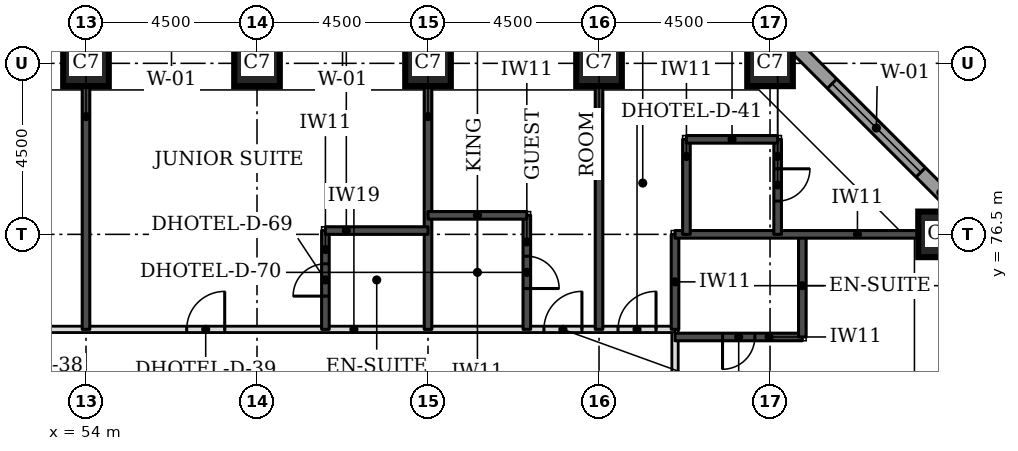
"""IFC4 building model, lengths in metres.
Left out: names, types, materials, properties, quantities, classifications, styles, units other than length and angle.
Written with IfcOpenShell. Run it as: python <this file> out.ifc"""

import sys

from ifc_helpers import new_model, si_unit, direction, frame, frame_2d, origin, origin_2d, place, context, subcontext, project, spatial, rectangle, extrude, element, fill, save


model = new_model("IFC4")
c1 = context("Model", 3, precision=1e-05, world=origin(), true_north=direction((0.0, 1.0)))
c2 = subcontext(c1, "Body", "Model", "MODEL_VIEW")
j1 = project(units=[si_unit("LENGTHUNIT", "METRE"), si_unit("PLANEANGLEUNIT", "RADIAN")], contexts=[c1])
p1 = place(None, origin())
s1 = spatial("IfcSite", under=j1, at=p1, CompositionType="ELEMENT")
p2 = place(p1, origin())
s2 = spatial("IfcBuilding", under=s1, at=p2, CompositionType="ELEMENT")
p3 = place(p2, frame((0.0, 0.0, 36.3)))
s3 = spatial("IfcBuildingStorey", under=s2, at=p3, CompositionType="ELEMENT", Elevation=36.3)
for number, where, z_axis, x_axis in (
    (1, (76.5, 76.5, 0.0), (0.0, 0.0, 1.0), (1.0, 0.0, 0.0)),
    (2, (54.0, 81.0, 0.0), (0.0, 0.0, 1.0), (1.0, 0.0, 0.0)),
    (3, (58.5, 81.0, 0.0), (0.0, 0.0, 1.0), (1.0, 0.0, 0.0)),
    (4, (63.0, 81.0, 0.0), (0.0, 0.0, 1.0), (1.0, 0.0, 0.0)),
    (5, (67.5, 81.0, 0.0), (0.0, 0.0, 1.0), (1.0, 0.0, 0.0)),
    (6, (72.0, 81.0, 0.0), (0.0, 0.0, 1.0), (1.0, 0.0, 0.0)),
):
    element("IfcColumn", number, at=place(p3, frame(where, z_axis=z_axis, x_axis=x_axis)), inside=s3, PredefinedType="COLUMN", context=c2, shape_type="SweptSolid", body=[
        extrude(rectangle(XDim=1.2, YDim=1.2, at=origin_2d()), origin(), (0.0, 0.0, 1.0), 3.3),
    ])
p4 = place(p3, frame((77.326, 76.77, 0.0), z_axis=(0.0, 0.0, 1.0), x_axis=(-0.707106781187, 0.707106781187, 0.0)))
e7 = element("IfcWall", 7, at=p4, inside=s3, PredefinedType="STANDARD", context=c2, shape_type="SweptSolid", body=[
    extrude(rectangle(XDim=7.151, YDim=0.35, at=frame_2d((3.576, 0.0))), origin(), (0.0, 0.0, 1.0), 3.055),
])
p5 = place(p4, frame((1.926, 0.0, 0.8)))
e8 = element("IfcOpeningElement", 8, at=p5, cuts=e7, PredefinedType="OPENING", context=c2, shape_type="SweptSolid", body=[
    extrude(rectangle(XDim=3.3, YDim=1.5, at=frame_2d((1.65, 0.75))), frame((0.0, 0.185, 0.0), z_axis=(0.0, -1.0, 0.0), x_axis=(1.0, 0.0, 0.0)), (0.0, 0.0, 1.0), 0.37),
])
p6 = place(p3, frame((69.5, 47.5, 0.0), z_axis=(0.0, 0.0, 1.0), x_axis=(0.0, 1.0, 0.0)))
e9 = element("IfcWall", 9, at=p6, inside=s3, PredefinedType="PARTITIONING", context=c2, shape_type="SweptSolid", body=[
    extrude(rectangle(XDim=26.5, YDim=0.15, at=frame_2d((13.25, 0.0))), origin(), (0.0, 0.0, 1.0), 3.08),
])
p7 = place(p6, frame((22.65, 0.0, 0.0)))
e10 = element("IfcOpeningElement", 10, at=p7, cuts=e9, PredefinedType="OPENING", context=c2, shape_type="SweptSolid", body=[
    extrude(rectangle(XDim=1.0, YDim=2.1, at=frame_2d((0.5, 1.05))), frame((0.0, 0.085, 0.0), z_axis=(0.0, -1.0, 0.0), x_axis=(1.0, 0.0, 0.0)), (0.0, 0.0, 1.0), 0.17),
])
p8 = place(p6, frame((16.6, 0.0, 0.0)))
e11 = element("IfcOpeningElement", 11, at=p8, cuts=e9, PredefinedType="OPENING", context=c2, shape_type="SweptSolid", body=[
    extrude(rectangle(XDim=1.0, YDim=2.1, at=frame_2d((0.5, 1.05))), frame((0.0, 0.085, 0.0), z_axis=(0.0, -1.0, 0.0), x_axis=(1.0, 0.0, 0.0)), (0.0, 0.0, 1.0), 0.17),
])
p9 = place(p6, frame((4.25, 0.0, 0.0)))
e12 = element("IfcOpeningElement", 12, at=p9, cuts=e9, PredefinedType="OPENING", context=c2, shape_type="SweptSolid", body=[
    extrude(rectangle(XDim=1.1, YDim=2.1, at=frame_2d((0.55, 1.05))), frame((0.0, 0.085, 0.0), z_axis=(0.0, -1.0, 0.0), x_axis=(1.0, 0.0, 0.0)), (0.0, 0.0, 1.0), 0.17),
])
p10 = place(p6, frame((0.55, 0.0, 0.0)))
e13 = element("IfcOpeningElement", 13, at=p10, cuts=e9, PredefinedType="OPENING", context=c2, shape_type="SweptSolid", body=[
    extrude(rectangle(XDim=1.0, YDim=2.1, at=frame_2d((0.5, 1.05))), frame((0.0, 0.085, 0.0), z_axis=(0.0, -1.0, 0.0), x_axis=(1.0, 0.0, 0.0)), (0.0, 0.0, 1.0), 0.17),
])
p11 = place(p3, frame((43.0, 74.0, 0.0), z_axis=(0.0, 0.0, 1.0), x_axis=(1.0, 0.0, 0.0)))
e14 = element("IfcWall", 14, at=p11, inside=s3, PredefinedType="PARTITIONING", context=c2, shape_type="SweptSolid", body=[
    extrude(rectangle(XDim=26.5, YDim=0.15, at=frame_2d((13.25, 0.0))), origin(), (0.0, 0.0, 1.0), 3.08),
])
p12 = place(p11, frame((7.6, 0.0, 0.0)))
e15 = element("IfcOpeningElement", 15, at=p12, cuts=e14, PredefinedType="OPENING", context=c2, shape_type="SweptSolid", body=[
    extrude(rectangle(XDim=1.0, YDim=2.1, at=frame_2d((0.5, 1.05))), frame((0.0, 0.085, 0.0), z_axis=(0.0, -1.0, 0.0), x_axis=(1.0, 0.0, 0.0)), (0.0, 0.0, 1.0), 0.17),
])
p13 = place(p11, frame((13.65, 0.0, 0.0)))
e16 = element("IfcOpeningElement", 16, at=p13, cuts=e14, PredefinedType="OPENING", context=c2, shape_type="SweptSolid", body=[
    extrude(rectangle(XDim=1.0, YDim=2.1, at=frame_2d((0.5, 1.05))), frame((0.0, 0.085, 0.0), z_axis=(0.0, -1.0, 0.0), x_axis=(1.0, 0.0, 0.0)), (0.0, 0.0, 1.0), 0.17),
])
p14 = place(p11, frame((23.05, 0.0, 0.0)))
e17 = element("IfcOpeningElement", 17, at=p14, cuts=e14, PredefinedType="OPENING", context=c2, shape_type="SweptSolid", body=[
    extrude(rectangle(XDim=1.0, YDim=2.1, at=frame_2d((0.5, 1.05))), frame((0.0, 0.085, 0.0), z_axis=(0.0, -1.0, 0.0), x_axis=(1.0, 0.0, 0.0)), (0.0, 0.0, 1.0), 0.17),
])
p15 = place(p11, frame((0.5, 0.0, 0.0)))
e18 = element("IfcOpeningElement", 18, at=p15, cuts=e14, PredefinedType="OPENING", context=c2, shape_type="SweptSolid", body=[
    extrude(rectangle(XDim=1.0, YDim=2.1, at=frame_2d((0.5, 1.05))), frame((0.0, 0.085, 0.0), z_axis=(0.0, -1.0, 0.0), x_axis=(1.0, 0.0, 0.0)), (0.0, 0.0, 1.0), 0.17),
])
p16 = place(p11, frame((25.0, 0.0, 0.0)))
e19 = element("IfcOpeningElement", 19, at=p16, cuts=e14, PredefinedType="OPENING", context=c2, shape_type="SweptSolid", body=[
    extrude(rectangle(XDim=1.0, YDim=2.1, at=frame_2d((0.5, 1.05))), frame((0.0, 0.085, 0.0), z_axis=(0.0, -1.0, 0.0), x_axis=(1.0, 0.0, 0.0)), (0.0, 0.0, 1.0), 0.17),
])
p17 = place(p3, frame((69.5, 73.8, 0.0), z_axis=(0.0, 0.0, 1.0), x_axis=(1.0, 0.0, 0.0)))
e20 = element("IfcWall", 20, at=p17, inside=s3, PredefinedType="SOLIDWALL", context=c2, shape_type="SweptSolid", body=[
    extrude(rectangle(XDim=3.35, YDim=0.2, at=frame_2d((1.675, 0.0))), origin(), (0.0, 0.0, 1.0), 3.08),
])
p18 = place(p17, frame((1.25, 0.0, 0.0)))
e21 = element("IfcOpeningElement", 21, at=p18, cuts=e20, PredefinedType="OPENING", context=c2, shape_type="SweptSolid", body=[
    extrude(rectangle(XDim=0.85, YDim=2.1, at=frame_2d((0.425, 1.05))), frame((0.0, 0.11, 0.0), z_axis=(0.0, -1.0, 0.0), x_axis=(1.0, 0.0, 0.0)), (0.0, 0.0, 1.0), 0.22),
])
p19 = place(p3, frame((72.85, 73.8, 0.0), z_axis=(0.0, 0.0, 1.0), x_axis=(0.0, 1.0, 0.0)))
e22 = element("IfcWall", 22, at=p19, inside=s3, PredefinedType="SOLIDWALL", context=c2, shape_type="SweptSolid", body=[
    extrude(rectangle(XDim=2.7, YDim=0.2, at=frame_2d((1.35, 0.0))), origin(), (0.0, 0.0, 1.0), 3.08),
])
p20 = place(p3, frame((54.0, 74.0, 0.0), z_axis=(0.0, 0.0, 1.0), x_axis=(0.0, 1.0, 0.0)))
e23 = element("IfcWall", 23, at=p20, inside=s3, PredefinedType="SOLIDWALL", context=c2, shape_type="SweptSolid", body=[
    extrude(rectangle(XDim=6.4, YDim=0.2, at=frame_2d((3.2, 0.0))), origin(), (0.0, 0.0, 1.0), 3.08),
])
p21 = place(p3, frame((60.3, 74.0, 0.0), z_axis=(0.0, 0.0, 1.0), x_axis=(0.0, 1.0, 0.0)))
e24 = element("IfcWall", 24, at=p21, inside=s3, PredefinedType="SOLIDWALL", context=c2, shape_type="SweptSolid", body=[
    extrude(rectangle(XDim=2.6, YDim=0.2, at=frame_2d((1.3, 0.0))), origin(), (0.0, 0.0, 1.0), 3.08),
])
p22 = place(p21, frame((0.875, 0.0, 0.0)))
e25 = element("IfcOpeningElement", 25, at=p22, cuts=e24, PredefinedType="OPENING", context=c2, shape_type="SweptSolid", body=[
    extrude(rectangle(XDim=0.85, YDim=2.1, at=frame_2d((0.425, 1.05))), frame((0.0, 0.11, 0.0), z_axis=(0.0, -1.0, 0.0), x_axis=(1.0, 0.0, 0.0)), (0.0, 0.0, 1.0), 0.22),
])
p23 = place(p3, frame((63.0, 74.0, 0.0), z_axis=(0.0, 0.0, 1.0), x_axis=(0.0, 1.0, 0.0)))
e26 = element("IfcWall", 26, at=p23, inside=s3, PredefinedType="SOLIDWALL", context=c2, shape_type="SweptSolid", body=[
    extrude(rectangle(XDim=6.4, YDim=0.2, at=frame_2d((3.2, 0.0))), origin(), (0.0, 0.0, 1.0), 3.08),
])
p24 = place(p3, frame((65.6, 74.0, 0.0), z_axis=(0.0, 0.0, 1.0), x_axis=(0.0, 1.0, 0.0)))
e27 = element("IfcWall", 27, at=p24, inside=s3, PredefinedType="SOLIDWALL", context=c2, shape_type="SweptSolid", body=[
    extrude(rectangle(XDim=3.0, YDim=0.2, at=frame_2d((1.5, 0.0))), origin(), (0.0, 0.0, 1.0), 3.08),
])
p25 = place(p24, frame((1.075, 0.0, 0.0)))
e28 = element("IfcOpeningElement", 28, at=p25, cuts=e27, PredefinedType="OPENING", context=c2, shape_type="SweptSolid", body=[
    extrude(rectangle(XDim=0.85, YDim=2.1, at=frame_2d((0.425, 1.05))), frame((0.0, 0.11, 0.0), z_axis=(0.0, -1.0, 0.0), x_axis=(1.0, 0.0, 0.0)), (0.0, 0.0, 1.0), 0.22),
])
p26 = place(p3, frame((67.5, 74.0, 0.0), z_axis=(0.0, 0.0, 1.0), x_axis=(0.0, 1.0, 0.0)))
e29 = element("IfcWall", 29, at=p26, inside=s3, PredefinedType="SOLIDWALL", context=c2, shape_type="SweptSolid", body=[
    extrude(rectangle(XDim=6.4, YDim=0.2, at=frame_2d((3.2, 0.0))), origin(), (0.0, 0.0, 1.0), 3.08),
])
p27 = place(p3, frame((69.5, 74.0, 0.0), z_axis=(0.0, 0.0, 1.0), x_axis=(0.0, 1.0, 0.0)))
e30 = element("IfcWall", 30, at=p27, inside=s3, PredefinedType="SOLIDWALL", context=c2, shape_type="SweptSolid", body=[
    extrude(rectangle(XDim=2.5, YDim=0.2, at=frame_2d((1.25, 0.0))), origin(), (0.0, 0.0, 1.0), 3.08),
])
p28 = place(p3, frame((69.5, 76.5, 0.0), z_axis=(0.0, 0.0, 1.0), x_axis=(1.0, 0.0, 0.0)))
e31 = element("IfcWall", 31, at=p28, inside=s3, PredefinedType="SOLIDWALL", context=c2, shape_type="SweptSolid", body=[
    extrude(rectangle(XDim=6.4, YDim=0.2, at=frame_2d((3.2, 0.0))), origin(), (0.0, 0.0, 1.0), 3.08),
])
p29 = place(p3, frame((69.8, 76.5, 0.0), z_axis=(0.0, 0.0, 1.0), x_axis=(0.0, 1.0, 0.0)))
e32 = element("IfcWall", 32, at=p29, inside=s3, PredefinedType="SOLIDWALL", context=c2, shape_type="SweptSolid", body=[
    extrude(rectangle(XDim=2.5, YDim=0.2, at=frame_2d((1.25, 0.0))), origin(), (0.0, 0.0, 1.0), 3.08),
])
p30 = place(p3, frame((72.2, 76.5, 0.0), z_axis=(0.0, 0.0, 1.0), x_axis=(0.0, 1.0, 0.0)))
e33 = element("IfcWall", 33, at=p30, inside=s3, PredefinedType="SOLIDWALL", context=c2, shape_type="SweptSolid", body=[
    extrude(rectangle(XDim=2.5, YDim=0.2, at=frame_2d((1.25, 0.0))), origin(), (0.0, 0.0, 1.0), 3.08),
])
p31 = place(p30, frame((0.875, 0.0, 0.0)))
e34 = element("IfcOpeningElement", 34, at=p31, cuts=e33, PredefinedType="OPENING", context=c2, shape_type="SweptSolid", body=[
    extrude(rectangle(XDim=0.85, YDim=2.1, at=frame_2d((0.425, 1.05))), frame((0.0, 0.11, 0.0), z_axis=(0.0, -1.0, 0.0), x_axis=(1.0, 0.0, 0.0)), (0.0, 0.0, 1.0), 0.22),
])
p32 = place(p3, frame((60.3, 76.6, 0.0), z_axis=(0.0, 0.0, 1.0), x_axis=(1.0, 0.0, 0.0)))
e35 = element("IfcWall", 35, at=p32, inside=s3, PredefinedType="SOLIDWALL", context=c2, shape_type="SweptSolid", body=[
    extrude(rectangle(XDim=2.7, YDim=0.2, at=frame_2d((1.35, 0.0))), origin(), (0.0, 0.0, 1.0), 3.08),
])
p33 = place(p3, frame((63.0, 77.0, 0.0), z_axis=(0.0, 0.0, 1.0), x_axis=(1.0, 0.0, 0.0)))
e36 = element("IfcWall", 36, at=p33, inside=s3, PredefinedType="SOLIDWALL", context=c2, shape_type="SweptSolid", body=[
    extrude(rectangle(XDim=2.6, YDim=0.2, at=frame_2d((1.3, 0.0))), origin(), (0.0, 0.0, 1.0), 3.08),
])
p34 = place(p3, frame((69.8, 79.0, 0.0), z_axis=(0.0, 0.0, 1.0), x_axis=(1.0, 0.0, 0.0)))
e37 = element("IfcWall", 37, at=p34, inside=s3, PredefinedType="SOLIDWALL", context=c2, shape_type="SweptSolid", body=[
    extrude(rectangle(XDim=2.4, YDim=0.2, at=frame_2d((1.2, 0.0))), origin(), (0.0, 0.0, 1.0), 3.08),
])
p35 = place(p5, origin())
e38 = element("IfcWindow", 38, at=p35, inside=s3, PartitioningType="SINGLE_PANEL", PredefinedType="WINDOW", context=c2, shape_type="SweptSolid", body=[
    extrude(rectangle(XDim=3.3, YDim=1.5, at=frame_2d((1.65, 0.75))), frame((0.0, 0.085, 0.0), z_axis=(0.0, -1.0, 0.0), x_axis=(1.0, 0.0, 0.0)), (0.0, 0.0, 1.0), 0.06),
])
fill(e8, e38)
p36 = place(p13, origin())
e39 = element("IfcDoor", 39, at=p36, inside=s3, OperationType="SINGLE_SWING_RIGHT", PredefinedType="DOOR", context=c2, shape_type="SweptSolid", body=[
    extrude(rectangle(XDim=1.0, YDim=2.1, at=frame_2d((0.5, 1.05))), frame((0.0, 0.025, 0.0), z_axis=(0.0, -1.0, 0.0), x_axis=(1.0, 0.0, 0.0)), (0.0, 0.0, 1.0), 0.05),
])
fill(e16, e39)
p37 = place(p22, origin())
e40 = element("IfcDoor", 40, at=p37, inside=s3, OperationType="SINGLE_SWING_LEFT", PredefinedType="DOOR", context=c2, shape_type="SweptSolid", body=[
    extrude(rectangle(XDim=0.85, YDim=2.1, at=frame_2d((0.425, 1.05))), frame((0.0, 0.025, 0.0), z_axis=(0.0, -1.0, 0.0), x_axis=(1.0, 0.0, 0.0)), (0.0, 0.0, 1.0), 0.05),
])
fill(e25, e40)
p38 = place(p14, origin())
e41 = element("IfcDoor", 41, at=p38, inside=s3, OperationType="SINGLE_SWING_RIGHT", PredefinedType="DOOR", context=c2, shape_type="SweptSolid", body=[
    extrude(rectangle(XDim=1.0, YDim=2.1, at=frame_2d((0.5, 1.05))), frame((0.0, 0.025, 0.0), z_axis=(0.0, -1.0, 0.0), x_axis=(1.0, 0.0, 0.0)), (0.0, 0.0, 1.0), 0.05),
])
fill(e17, e41)
p39 = place(p25, frame((0.85, 0.0, 0.0), z_axis=(0.0, 0.0, 1.0), x_axis=(-1.0, 0.0, 0.0)))
e42 = element("IfcDoor", 42, at=p39, inside=s3, OperationType="SINGLE_SWING_RIGHT", PredefinedType="DOOR", context=c2, shape_type="SweptSolid", body=[
    extrude(rectangle(XDim=0.85, YDim=2.1, at=frame_2d((0.425, 1.05))), frame((0.0, 0.025, 0.0), z_axis=(0.0, -1.0, 0.0), x_axis=(1.0, 0.0, 0.0)), (0.0, 0.0, 1.0), 0.05),
])
fill(e28, e42)
p40 = place(p18, frame((0.85, 0.0, 0.0), z_axis=(0.0, 0.0, 1.0), x_axis=(-1.0, 0.0, 0.0)))
e43 = element("IfcDoor", 43, at=p40, inside=s3, OperationType="SINGLE_SWING_RIGHT", PredefinedType="DOOR", context=c2, shape_type="SweptSolid", body=[
    extrude(rectangle(XDim=0.85, YDim=2.1, at=frame_2d((0.425, 1.05))), frame((0.0, 0.025, 0.0), z_axis=(0.0, -1.0, 0.0), x_axis=(1.0, 0.0, 0.0)), (0.0, 0.0, 1.0), 0.05),
])
fill(e21, e43)
p41 = place(p16, origin())
e44 = element("IfcDoor", 44, at=p41, inside=s3, OperationType="SINGLE_SWING_RIGHT", PredefinedType="DOOR", context=c2, shape_type="SweptSolid", body=[
    extrude(rectangle(XDim=1.0, YDim=2.1, at=frame_2d((0.5, 1.05))), frame((0.0, 0.025, 0.0), z_axis=(0.0, -1.0, 0.0), x_axis=(1.0, 0.0, 0.0)), (0.0, 0.0, 1.0), 0.05),
])
fill(e19, e44)
p42 = place(p31, frame((0.85, 0.0, 0.0), z_axis=(0.0, 0.0, 1.0), x_axis=(-1.0, 0.0, 0.0)))
e45 = element("IfcDoor", 45, at=p42, inside=s3, OperationType="SINGLE_SWING_LEFT", PredefinedType="DOOR", context=c2, shape_type="SweptSolid", body=[
    extrude(rectangle(XDim=0.85, YDim=2.1, at=frame_2d((0.425, 1.05))), frame((0.0, 0.025, 0.0), z_axis=(0.0, -1.0, 0.0), x_axis=(1.0, 0.0, 0.0)), (0.0, 0.0, 1.0), 0.05),
])
fill(e34, e45)
save(model, sys.argv[1])
